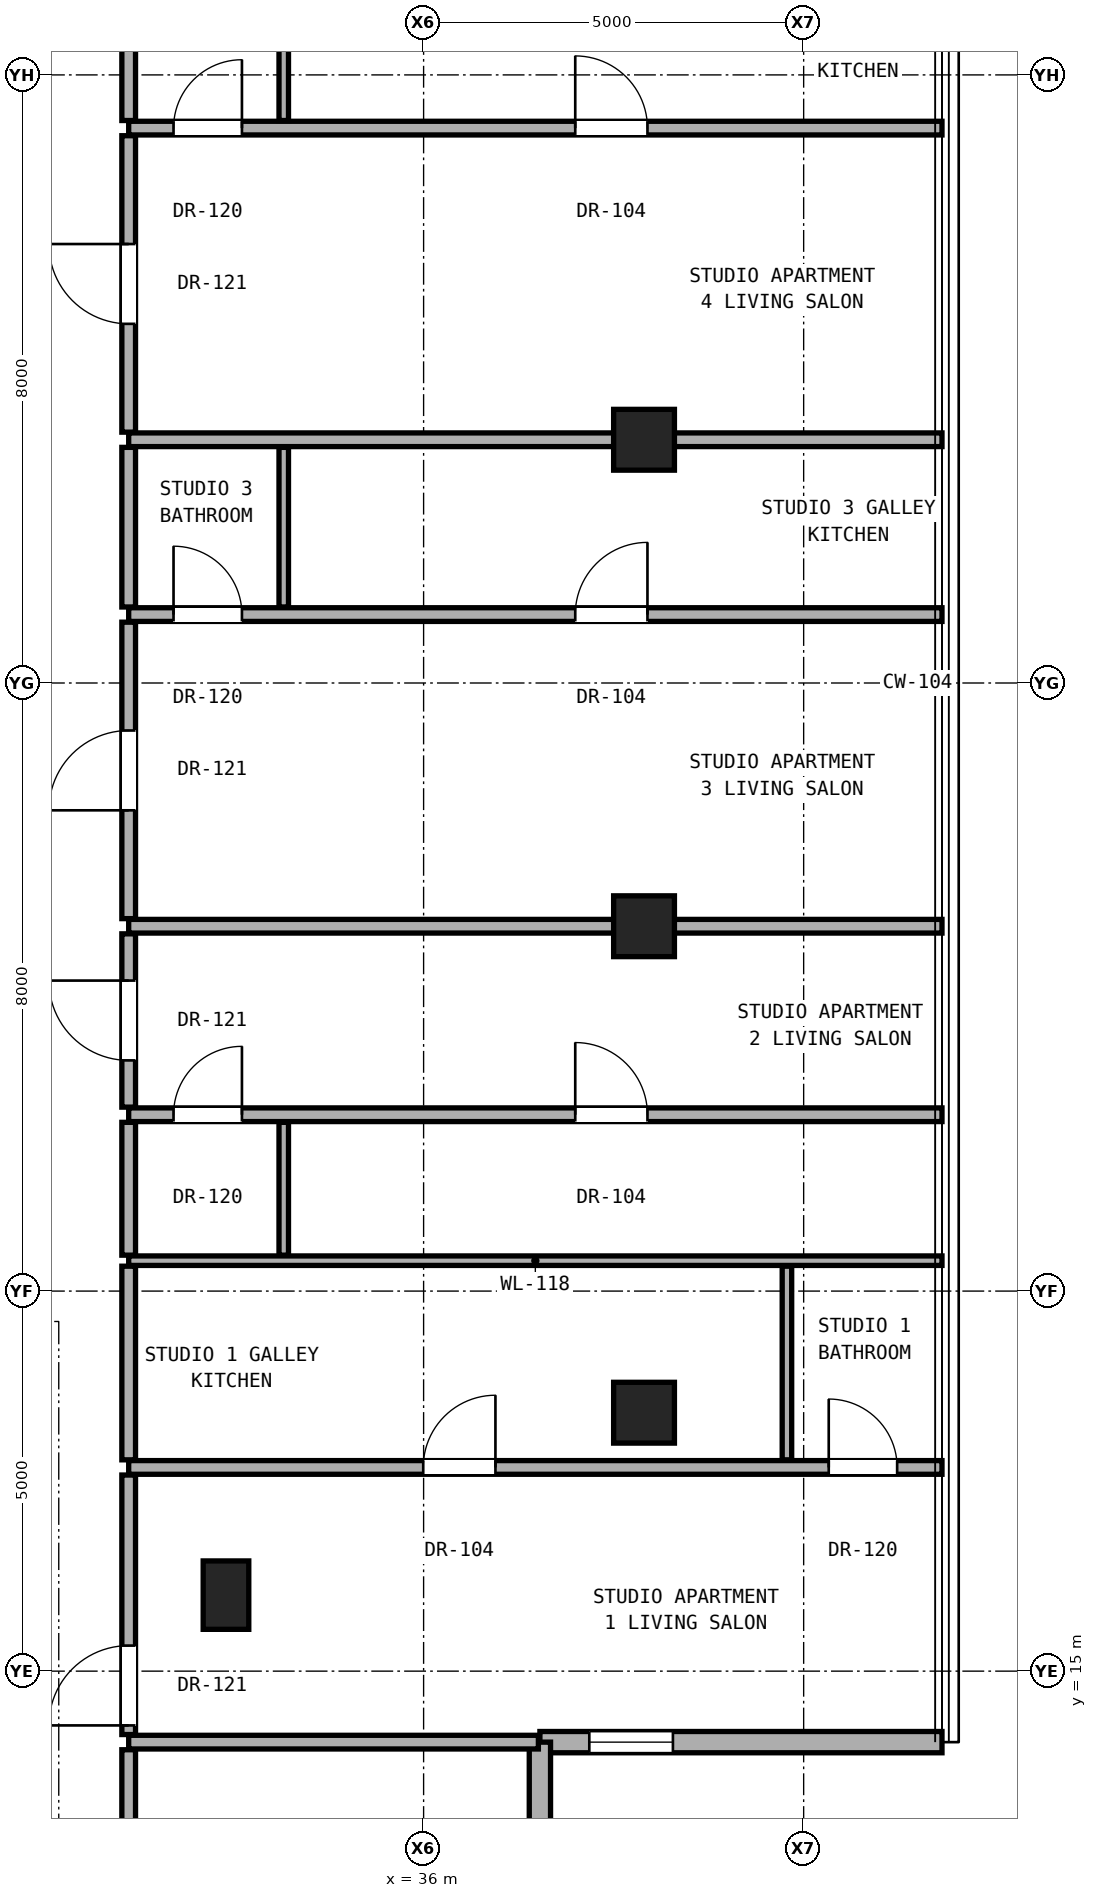
"""IFC4 building model, lengths in metres.
Left out: names, types, materials, properties, quantities, classifications, styles, units other than length and angle.
Written with IfcOpenShell. Run it as: python <this file> out.ifc"""

import sys

from ifc_helpers import new_model, si_unit, direction, frame, frame_2d, origin, origin_2d, place, context, subcontext, project, spatial, rectangle, hollow_rectangle, extrude, element, fill, save


model = new_model("IFC4")
c1 = context("Model", 3, precision=1e-05, world=origin(), true_north=direction((0.0, 1.0)))
c2 = subcontext(c1, "Body", "Model", "MODEL_VIEW")
j1 = project(units=[si_unit("LENGTHUNIT", "METRE"), si_unit("PLANEANGLEUNIT", "RADIAN")], contexts=[c1])
p1 = place(None, origin())
s1 = spatial("IfcSite", under=j1, at=p1, CompositionType="ELEMENT")
p2 = place(p1, origin())
s2 = spatial("IfcBuilding", under=s1, at=p2, CompositionType="ELEMENT")
p3 = place(p2, frame((0.0, 0.0, 245.8)))
s3 = spatial("IfcBuildingStorey", under=s2, at=p3, CompositionType="ELEMENT", Elevation=245.8)
for number, where, z_axis, x_axis in (
    (1, (38.9, 18.4, 0.0), (0.0, 0.0, 1.0), (1.0, 0.0, 0.0)),
    (2, (38.9, 24.8, 0.0), (0.0, 0.0, 1.0), (1.0, 0.0, 0.0)),
    (3, (38.9, 31.2, 0.0), (0.0, 0.0, 1.0), (1.0, 0.0, 0.0)),
):
    element("IfcColumn", number, at=place(p3, frame(where, z_axis=z_axis, x_axis=x_axis)), inside=s3, PredefinedType="COLUMN", context=c2, shape_type="SweptSolid", body=[
        extrude(hollow_rectangle(XDim=0.8, YDim=0.8, WallThickness=0.045, at=origin_2d()), origin(), (0.0, 0.0, 1.0), 3.3),
    ])
p4 = place(p3, frame((33.4, 16.0, 0.0), z_axis=(0.0, 0.0, 1.0), x_axis=(1.0, 0.0, 0.0)))
e4 = element("IfcColumn", 4, at=p4, inside=s3, PredefinedType="PILASTER", context=c2, shape_type="SweptSolid", body=[
    extrude(rectangle(XDim=0.6, YDim=0.9, at=origin_2d()), origin(), (0.0, 0.0, 1.0), 3.3),
])
p5 = place(p3, frame((37.53, 14.066, 0.0), z_axis=(0.0, 0.0, 1.0), x_axis=(1.0, 0.0, 0.0)))
e5 = element("IfcWall", 5, at=p5, inside=s3, PredefinedType="SOLIDWALL", context=c2, shape_type="SweptSolid", body=[
    extrude(rectangle(XDim=5.29, YDim=0.28, at=frame_2d((2.645, 0.0))), origin(), (0.0, 0.0, 1.0), 3.08),
])
p6 = place(p5, frame((0.65, 0.0, 0.85)))
e6 = element("IfcOpeningElement", 6, at=p6, cuts=e5, PredefinedType="OPENING", context=c2, shape_type="SweptSolid", body=[
    extrude(rectangle(XDim=1.1, YDim=2.0, at=frame_2d((0.55, 1.0))), frame((0.0, 0.15, 0.0), z_axis=(0.0, -1.0, 0.0), x_axis=(1.0, 0.0, 0.0)), (0.0, 0.0, 1.0), 0.3),
])
p7 = place(p3, frame((37.53, 8.776, 0.0), z_axis=(0.0, 0.0, 1.0), x_axis=(0.0, 1.0, 0.0)))
e7 = element("IfcWall", 7, at=p7, inside=s3, PredefinedType="SOLIDWALL", context=c2, shape_type="SweptSolid", body=[
    extrude(rectangle(XDim=5.29, YDim=0.28, at=frame_2d((2.645, 0.0))), origin(), (0.0, 0.0, 1.0), 3.08),
])
p8 = place(p3, frame((32.12, 14.066, 0.0), z_axis=(0.0, 0.0, 1.0), x_axis=(1.0, 0.0, 0.0)))
e8 = element("IfcWall", 8, at=p8, inside=s3, PredefinedType="PARTITIONING", context=c2, shape_type="SweptSolid", body=[
    extrude(rectangle(XDim=5.39, YDim=0.18, at=frame_2d((2.695, 0.0))), origin(), (0.0, 0.0, 1.0), 3.1),
])
p9 = place(p3, frame((32.12, 17.68, 0.0), z_axis=(0.0, 0.0, 1.0), x_axis=(1.0, 0.0, 0.0)))
e9 = element("IfcWall", 9, at=p9, inside=s3, PredefinedType="PARTITIONING", context=c2, shape_type="SweptSolid", body=[
    extrude(rectangle(XDim=10.7, YDim=0.18, at=frame_2d((5.35, 0.0))), origin(), (0.0, 0.0, 1.0), 2.543),
])
p10 = place(p9, frame((3.875, 0.0, 0.0)))
e10 = element("IfcOpeningElement", 10, at=p10, cuts=e9, PredefinedType="OPENING", context=c2, shape_type="SweptSolid", body=[
    extrude(rectangle(XDim=0.95, YDim=2.15, at=frame_2d((0.475, 1.075))), frame((0.0, 0.1, 0.0), z_axis=(0.0, -1.0, 0.0), x_axis=(1.0, 0.0, 0.0)), (0.0, 0.0, 1.0), 0.2),
])
p11 = place(p9, frame((9.21, 0.0, 0.0)))
e11 = element("IfcOpeningElement", 11, at=p11, cuts=e9, PredefinedType="OPENING", context=c2, shape_type="SweptSolid", body=[
    extrude(rectangle(XDim=0.9, YDim=2.1, at=frame_2d((0.45, 1.05))), frame((0.0, 0.1, 0.0), z_axis=(0.0, -1.0, 0.0), x_axis=(1.0, 0.0, 0.0)), (0.0, 0.0, 1.0), 0.2),
])
p12 = place(p3, frame((32.12, 20.4, 0.0), z_axis=(0.0, 0.0, 1.0), x_axis=(1.0, 0.0, 0.0)))
e12 = element("IfcWall", 12, at=p12, inside=s3, PredefinedType="PARTITIONING", context=c2, shape_type="SweptSolid", body=[
    extrude(rectangle(XDim=10.7, YDim=0.125, at=frame_2d((5.35, 0.0))), origin(), (0.0, 0.0, 1.0), 2.319),
])
p13 = place(p3, frame((32.12, 22.32, 0.0), z_axis=(0.0, 0.0, 1.0), x_axis=(1.0, 0.0, 0.0)))
e13 = element("IfcWall", 13, at=p13, inside=s3, PredefinedType="PARTITIONING", context=c2, shape_type="SweptSolid", body=[
    extrude(rectangle(XDim=10.7, YDim=0.18, at=frame_2d((5.35, 0.0))), origin(), (0.0, 0.0, 1.0), 2.319),
])
p14 = place(p13, frame((5.875, 0.0, 0.0)))
e14 = element("IfcOpeningElement", 14, at=p14, cuts=e13, PredefinedType="OPENING", context=c2, shape_type="SweptSolid", body=[
    extrude(rectangle(XDim=0.95, YDim=2.15, at=frame_2d((0.475, 1.075))), frame((0.0, 0.1, 0.0), z_axis=(0.0, -1.0, 0.0), x_axis=(1.0, 0.0, 0.0)), (0.0, 0.0, 1.0), 0.2),
])
p15 = place(p13, frame((0.59, 0.0, 0.0)))
e15 = element("IfcOpeningElement", 15, at=p15, cuts=e13, PredefinedType="OPENING", context=c2, shape_type="SweptSolid", body=[
    extrude(rectangle(XDim=0.9, YDim=2.1, at=frame_2d((0.45, 1.05))), frame((0.0, 0.1, 0.0), z_axis=(0.0, -1.0, 0.0), x_axis=(1.0, 0.0, 0.0)), (0.0, 0.0, 1.0), 0.2),
])
p16 = place(p3, frame((32.12, 24.8, 0.0), z_axis=(0.0, 0.0, 1.0), x_axis=(1.0, 0.0, 0.0)))
e16 = element("IfcWall", 16, at=p16, inside=s3, PredefinedType="PARTITIONING", context=c2, shape_type="SweptSolid", body=[
    extrude(rectangle(XDim=10.7, YDim=0.18, at=frame_2d((5.35, 0.0))), origin(), (0.0, 0.0, 1.0), 2.319),
])
p17 = place(p3, frame((32.12, 28.9, 0.0), z_axis=(0.0, 0.0, 1.0), x_axis=(1.0, 0.0, 0.0)))
e17 = element("IfcWall", 17, at=p17, inside=s3, PredefinedType="PARTITIONING", context=c2, shape_type="SweptSolid", body=[
    extrude(rectangle(XDim=10.7, YDim=0.18, at=frame_2d((5.35, 0.0))), origin(), (0.0, 0.0, 1.0), 2.319),
])
p18 = place(p17, frame((5.875, 0.0, 0.0)))
e18 = element("IfcOpeningElement", 18, at=p18, cuts=e17, PredefinedType="OPENING", context=c2, shape_type="SweptSolid", body=[
    extrude(rectangle(XDim=0.95, YDim=2.15, at=frame_2d((0.475, 1.075))), frame((0.0, 0.1, 0.0), z_axis=(0.0, -1.0, 0.0), x_axis=(1.0, 0.0, 0.0)), (0.0, 0.0, 1.0), 0.2),
])
p19 = place(p17, frame((0.59, 0.0, 0.0)))
e19 = element("IfcOpeningElement", 19, at=p19, cuts=e17, PredefinedType="OPENING", context=c2, shape_type="SweptSolid", body=[
    extrude(rectangle(XDim=0.9, YDim=2.1, at=frame_2d((0.45, 1.05))), frame((0.0, 0.1, 0.0), z_axis=(0.0, -1.0, 0.0), x_axis=(1.0, 0.0, 0.0)), (0.0, 0.0, 1.0), 0.2),
])
p20 = place(p3, frame((32.12, 31.2, 0.0), z_axis=(0.0, 0.0, 1.0), x_axis=(1.0, 0.0, 0.0)))
e20 = element("IfcWall", 20, at=p20, inside=s3, PredefinedType="PARTITIONING", context=c2, shape_type="SweptSolid", body=[
    extrude(rectangle(XDim=10.7, YDim=0.18, at=frame_2d((5.35, 0.0))), origin(), (0.0, 0.0, 1.0), 2.319),
])
p21 = place(p3, frame((32.12, 35.3, 0.0), z_axis=(0.0, 0.0, 1.0), x_axis=(1.0, 0.0, 0.0)))
e21 = element("IfcWall", 21, at=p21, inside=s3, PredefinedType="PARTITIONING", context=c2, shape_type="SweptSolid", body=[
    extrude(rectangle(XDim=10.7, YDim=0.18, at=frame_2d((5.35, 0.0))), origin(), (0.0, 0.0, 1.0), 2.319),
])
p22 = place(p21, frame((5.875, 0.0, 0.0)))
e22 = element("IfcOpeningElement", 22, at=p22, cuts=e21, PredefinedType="OPENING", context=c2, shape_type="SweptSolid", body=[
    extrude(rectangle(XDim=0.95, YDim=2.15, at=frame_2d((0.475, 1.075))), frame((0.0, 0.1, 0.0), z_axis=(0.0, -1.0, 0.0), x_axis=(1.0, 0.0, 0.0)), (0.0, 0.0, 1.0), 0.2),
])
p23 = place(p21, frame((0.59, 0.0, 0.0)))
e23 = element("IfcOpeningElement", 23, at=p23, cuts=e21, PredefinedType="OPENING", context=c2, shape_type="SweptSolid", body=[
    extrude(rectangle(XDim=0.9, YDim=2.1, at=frame_2d((0.45, 1.05))), frame((0.0, 0.1, 0.0), z_axis=(0.0, -1.0, 0.0), x_axis=(1.0, 0.0, 0.0)), (0.0, 0.0, 1.0), 0.2),
])
p24 = place(p3, frame((32.12, 8.776, 0.0), z_axis=(0.0, 0.0, 1.0), x_axis=(0.0, 1.0, 0.0)))
e24 = element("IfcWall", 24, at=p24, inside=s3, PredefinedType="PARTITIONING", context=c2, shape_type="SweptSolid", body=[
    extrude(rectangle(XDim=5.19, YDim=0.18, at=frame_2d((2.595, 0.0))), origin(), (0.0, 0.0, 1.0), 3.1),
])
p25 = place(p24, frame((2.12, 0.0, 0.0)))
e25 = element("IfcOpeningElement", 25, at=p25, cuts=e24, PredefinedType="OPENING", context=c2, shape_type="SweptSolid", body=[
    extrude(rectangle(XDim=0.95, YDim=2.15, at=frame_2d((0.475, 1.075))), frame((0.0, 0.1, 0.0), z_axis=(0.0, -1.0, 0.0), x_axis=(1.0, 0.0, 0.0)), (0.0, 0.0, 1.0), 0.2),
])
p26 = place(p3, frame((32.12, 14.166, 0.0), z_axis=(0.0, 0.0, 1.0), x_axis=(0.0, 1.0, 0.0)))
e26 = element("IfcWall", 26, at=p26, inside=s3, PredefinedType="PARTITIONING", context=c2, shape_type="SweptSolid", body=[
    extrude(rectangle(XDim=3.414, YDim=0.18, at=frame_2d((1.707, 0.0))), origin(), (0.0, 0.0, 1.0), 2.543),
])
p27 = place(p26, frame((0.12, 0.0, 0.0)))
e27 = element("IfcOpeningElement", 27, at=p27, cuts=e26, PredefinedType="OPENING", context=c2, shape_type="SweptSolid", body=[
    extrude(rectangle(XDim=1.05, YDim=2.2, at=frame_2d((0.525, 1.1))), frame((0.0, 0.1, 0.0), z_axis=(0.0, -1.0, 0.0), x_axis=(1.0, 0.0, 0.0)), (0.0, 0.0, 1.0), 0.2),
])
p28 = place(p3, frame((32.12, 17.78, 0.0), z_axis=(0.0, 0.0, 1.0), x_axis=(0.0, 1.0, 0.0)))
e28 = element("IfcWall", 28, at=p28, inside=s3, PredefinedType="PARTITIONING", context=c2, shape_type="SweptSolid", body=[
    extrude(rectangle(XDim=2.547, YDim=0.18, at=frame_2d((1.274, 0.0))), origin(), (0.0, 0.0, 1.0), 2.492),
])
p29 = place(p3, frame((32.12, 20.472, 0.0), z_axis=(0.0, 0.0, 1.0), x_axis=(0.0, 1.0, 0.0)))
e29 = element("IfcWall", 29, at=p29, inside=s3, PredefinedType="PARTITIONING", context=c2, shape_type="SweptSolid", body=[
    extrude(rectangle(XDim=1.748, YDim=0.18, at=frame_2d((0.874, 0.0))), origin(), (0.0, 0.0, 1.0), 3.1),
])
p30 = place(p3, frame((32.12, 22.42, 0.0), z_axis=(0.0, 0.0, 1.0), x_axis=(0.0, 1.0, 0.0)))
e30 = element("IfcWall", 30, at=p30, inside=s3, PredefinedType="PARTITIONING", context=c2, shape_type="SweptSolid", body=[
    extrude(rectangle(XDim=2.28, YDim=0.18, at=frame_2d((1.14, 0.0))), origin(), (0.0, 0.0, 1.0), 2.396),
])
p31 = place(p30, frame((0.615, 0.0, 0.0)))
e31 = element("IfcOpeningElement", 31, at=p31, cuts=e30, PredefinedType="OPENING", context=c2, shape_type="SweptSolid", body=[
    extrude(rectangle(XDim=1.05, YDim=2.2, at=frame_2d((0.525, 1.1))), frame((0.0, 0.1, 0.0), z_axis=(0.0, -1.0, 0.0), x_axis=(1.0, 0.0, 0.0)), (0.0, 0.0, 1.0), 0.2),
])
p32 = place(p3, frame((32.12, 24.9, 0.0), z_axis=(0.0, 0.0, 1.0), x_axis=(0.0, 1.0, 0.0)))
e32 = element("IfcWall", 32, at=p32, inside=s3, PredefinedType="PARTITIONING", context=c2, shape_type="SweptSolid", body=[
    extrude(rectangle(XDim=3.9, YDim=0.18, at=frame_2d((1.95, 0.0))), origin(), (0.0, 0.0, 1.0), 2.396),
])
p33 = place(p32, frame((1.425, 0.0, 0.0)))
e33 = element("IfcOpeningElement", 33, at=p33, cuts=e32, PredefinedType="OPENING", context=c2, shape_type="SweptSolid", body=[
    extrude(rectangle(XDim=1.05, YDim=2.2, at=frame_2d((0.525, 1.1))), frame((0.0, 0.1, 0.0), z_axis=(0.0, -1.0, 0.0), x_axis=(1.0, 0.0, 0.0)), (0.0, 0.0, 1.0), 0.2),
])
p34 = place(p3, frame((32.12, 29.0, 0.0), z_axis=(0.0, 0.0, 1.0), x_axis=(0.0, 1.0, 0.0)))
e34 = element("IfcWall", 34, at=p34, inside=s3, PredefinedType="PARTITIONING", context=c2, shape_type="SweptSolid", body=[
    extrude(rectangle(XDim=2.1, YDim=0.18, at=frame_2d((1.05, 0.0))), origin(), (0.0, 0.0, 1.0), 2.396),
])
p35 = place(p3, frame((32.12, 31.3, 0.0), z_axis=(0.0, 0.0, 1.0), x_axis=(0.0, 1.0, 0.0)))
e35 = element("IfcWall", 35, at=p35, inside=s3, PredefinedType="PARTITIONING", context=c2, shape_type="SweptSolid", body=[
    extrude(rectangle(XDim=3.9, YDim=0.18, at=frame_2d((1.95, 0.0))), origin(), (0.0, 0.0, 1.0), 2.396),
])
p36 = place(p35, frame((1.425, 0.0, 0.0)))
e36 = element("IfcOpeningElement", 36, at=p36, cuts=e35, PredefinedType="OPENING", context=c2, shape_type="SweptSolid", body=[
    extrude(rectangle(XDim=1.05, YDim=2.2, at=frame_2d((0.525, 1.1))), frame((0.0, 0.1, 0.0), z_axis=(0.0, -1.0, 0.0), x_axis=(1.0, 0.0, 0.0)), (0.0, 0.0, 1.0), 0.2),
])
p37 = place(p3, frame((32.12, 35.4, 0.0), z_axis=(0.0, 0.0, 1.0), x_axis=(0.0, 1.0, 0.0)))
e37 = element("IfcWall", 37, at=p37, inside=s3, PredefinedType="PARTITIONING", context=c2, shape_type="SweptSolid", body=[
    extrude(rectangle(XDim=2.1, YDim=0.18, at=frame_2d((1.05, 0.0))), origin(), (0.0, 0.0, 1.0), 2.492),
])
p38 = place(p3, frame((34.16, 20.472, 0.0), z_axis=(0.0, 0.0, 1.0), x_axis=(0.0, 1.0, 0.0)))
e38 = element("IfcWall", 38, at=p38, inside=s3, PredefinedType="PARTITIONING", context=c2, shape_type="SweptSolid", body=[
    extrude(rectangle(XDim=1.748, YDim=0.125, at=frame_2d((0.874, 0.0))), origin(), (0.0, 0.0, 1.0), 3.1),
])
p39 = place(p3, frame((34.16, 29.0, 0.0), z_axis=(0.0, 0.0, 1.0), x_axis=(0.0, 1.0, 0.0)))
e39 = element("IfcWall", 39, at=p39, inside=s3, PredefinedType="PARTITIONING", context=c2, shape_type="SweptSolid", body=[
    extrude(rectangle(XDim=2.1, YDim=0.125, at=frame_2d((1.05, 0.0))), origin(), (0.0, 0.0, 1.0), 2.396),
])
p40 = place(p3, frame((34.16, 35.4, 0.0), z_axis=(0.0, 0.0, 1.0), x_axis=(0.0, 1.0, 0.0)))
e40 = element("IfcWall", 40, at=p40, inside=s3, PredefinedType="PARTITIONING", context=c2, shape_type="SweptSolid", body=[
    extrude(rectangle(XDim=2.1, YDim=0.125, at=frame_2d((1.05, 0.0))), origin(), (0.0, 0.0, 1.0), 2.492),
])
p41 = place(p3, frame((40.78, 17.78, 0.0), z_axis=(0.0, 0.0, 1.0), x_axis=(0.0, 1.0, 0.0)))
e41 = element("IfcWall", 41, at=p41, inside=s3, PredefinedType="PARTITIONING", context=c2, shape_type="SweptSolid", body=[
    extrude(rectangle(XDim=2.547, YDim=0.125, at=frame_2d((1.274, 0.0))), origin(), (0.0, 0.0, 1.0), 3.1),
])
p42 = place(p6, origin())
e42 = element("IfcWindow", 42, at=p42, inside=s3, PartitioningType="SINGLE_PANEL", PredefinedType="WINDOW", context=c2, shape_type="SweptSolid", body=[
    extrude(rectangle(XDim=1.1, YDim=2.0, at=frame_2d((0.55, 1.0))), frame((0.0, 0.03, 0.0), z_axis=(0.0, -1.0, 0.0), x_axis=(1.0, 0.0, 0.0)), (0.0, 0.0, 1.0), 0.06),
])
fill(e6, e42)
p43 = place(p27, origin())
e43 = element("IfcDoor", 43, at=p43, inside=s3, OperationType="SINGLE_SWING_LEFT", PredefinedType="DOOR", context=c2, shape_type="SweptSolid", body=[
    extrude(rectangle(XDim=1.05, YDim=2.2, at=frame_2d((0.525, 1.1))), frame((0.0, 0.025, 0.0), z_axis=(0.0, -1.0, 0.0), x_axis=(1.0, 0.0, 0.0)), (0.0, 0.0, 1.0), 0.05),
])
fill(e27, e43)
p44 = place(p10, origin())
e44 = element("IfcDoor", 44, at=p44, inside=s3, OperationType="SINGLE_SWING_RIGHT", PredefinedType="DOOR", context=c2, shape_type="SweptSolid", body=[
    extrude(rectangle(XDim=0.95, YDim=2.15, at=frame_2d((0.475, 1.075))), frame((0.0, 0.025, 0.0), z_axis=(0.0, -1.0, 0.0), x_axis=(1.0, 0.0, 0.0)), (0.0, 0.0, 1.0), 0.05),
])
fill(e10, e44)
p45 = place(p11, origin())
e45 = element("IfcDoor", 45, at=p45, inside=s3, OperationType="SINGLE_SWING_LEFT", PredefinedType="DOOR", context=c2, shape_type="SweptSolid", body=[
    extrude(rectangle(XDim=0.9, YDim=2.1, at=frame_2d((0.45, 1.05))), frame((0.0, 0.025, 0.0), z_axis=(0.0, -1.0, 0.0), x_axis=(1.0, 0.0, 0.0)), (0.0, 0.0, 1.0), 0.05),
])
fill(e11, e45)
p46 = place(p31, origin())
e46 = element("IfcDoor", 46, at=p46, inside=s3, OperationType="SINGLE_SWING_RIGHT", PredefinedType="DOOR", context=c2, shape_type="SweptSolid", body=[
    extrude(rectangle(XDim=1.05, YDim=2.2, at=frame_2d((0.525, 1.1))), frame((0.0, 0.025, 0.0), z_axis=(0.0, -1.0, 0.0), x_axis=(1.0, 0.0, 0.0)), (0.0, 0.0, 1.0), 0.05),
])
fill(e31, e46)
p47 = place(p14, origin())
e47 = element("IfcDoor", 47, at=p47, inside=s3, OperationType="SINGLE_SWING_LEFT", PredefinedType="DOOR", context=c2, shape_type="SweptSolid", body=[
    extrude(rectangle(XDim=0.95, YDim=2.15, at=frame_2d((0.475, 1.075))), frame((0.0, 0.025, 0.0), z_axis=(0.0, -1.0, 0.0), x_axis=(1.0, 0.0, 0.0)), (0.0, 0.0, 1.0), 0.05),
])
fill(e14, e47)
p48 = place(p15, origin())
e48 = element("IfcDoor", 48, at=p48, inside=s3, OperationType="SINGLE_SWING_RIGHT", PredefinedType="DOOR", context=c2, shape_type="SweptSolid", body=[
    extrude(rectangle(XDim=0.9, YDim=2.1, at=frame_2d((0.45, 1.05))), frame((0.0, 0.025, 0.0), z_axis=(0.0, -1.0, 0.0), x_axis=(1.0, 0.0, 0.0)), (0.0, 0.0, 1.0), 0.05),
])
fill(e15, e48)
p49 = place(p33, origin())
e49 = element("IfcDoor", 49, at=p49, inside=s3, OperationType="SINGLE_SWING_LEFT", PredefinedType="DOOR", context=c2, shape_type="SweptSolid", body=[
    extrude(rectangle(XDim=1.05, YDim=2.2, at=frame_2d((0.525, 1.1))), frame((0.0, 0.025, 0.0), z_axis=(0.0, -1.0, 0.0), x_axis=(1.0, 0.0, 0.0)), (0.0, 0.0, 1.0), 0.05),
])
fill(e33, e49)
p50 = place(p18, origin())
e50 = element("IfcDoor", 50, at=p50, inside=s3, OperationType="SINGLE_SWING_RIGHT", PredefinedType="DOOR", context=c2, shape_type="SweptSolid", body=[
    extrude(rectangle(XDim=0.95, YDim=2.15, at=frame_2d((0.475, 1.075))), frame((0.0, 0.025, 0.0), z_axis=(0.0, -1.0, 0.0), x_axis=(1.0, 0.0, 0.0)), (0.0, 0.0, 1.0), 0.05),
])
fill(e18, e50)
p51 = place(p19, origin())
e51 = element("IfcDoor", 51, at=p51, inside=s3, OperationType="SINGLE_SWING_LEFT", PredefinedType="DOOR", context=c2, shape_type="SweptSolid", body=[
    extrude(rectangle(XDim=0.9, YDim=2.1, at=frame_2d((0.45, 1.05))), frame((0.0, 0.025, 0.0), z_axis=(0.0, -1.0, 0.0), x_axis=(1.0, 0.0, 0.0)), (0.0, 0.0, 1.0), 0.05),
])
fill(e19, e51)
p52 = place(p36, origin())
e52 = element("IfcDoor", 52, at=p52, inside=s3, OperationType="SINGLE_SWING_RIGHT", PredefinedType="DOOR", context=c2, shape_type="SweptSolid", body=[
    extrude(rectangle(XDim=1.05, YDim=2.2, at=frame_2d((0.525, 1.1))), frame((0.0, 0.025, 0.0), z_axis=(0.0, -1.0, 0.0), x_axis=(1.0, 0.0, 0.0)), (0.0, 0.0, 1.0), 0.05),
])
fill(e36, e52)
p53 = place(p22, origin())
e53 = element("IfcDoor", 53, at=p53, inside=s3, OperationType="SINGLE_SWING_LEFT", PredefinedType="DOOR", context=c2, shape_type="SweptSolid", body=[
    extrude(rectangle(XDim=0.95, YDim=2.15, at=frame_2d((0.475, 1.075))), frame((0.0, 0.025, 0.0), z_axis=(0.0, -1.0, 0.0), x_axis=(1.0, 0.0, 0.0)), (0.0, 0.0, 1.0), 0.05),
])
fill(e22, e53)
p54 = place(p23, origin())
e54 = element("IfcDoor", 54, at=p54, inside=s3, OperationType="SINGLE_SWING_RIGHT", PredefinedType="DOOR", context=c2, shape_type="SweptSolid", body=[
    extrude(rectangle(XDim=0.9, YDim=2.1, at=frame_2d((0.45, 1.05))), frame((0.0, 0.025, 0.0), z_axis=(0.0, -1.0, 0.0), x_axis=(1.0, 0.0, 0.0)), (0.0, 0.0, 1.0), 0.05),
])
fill(e23, e54)
save(model, sys.argv[1])
